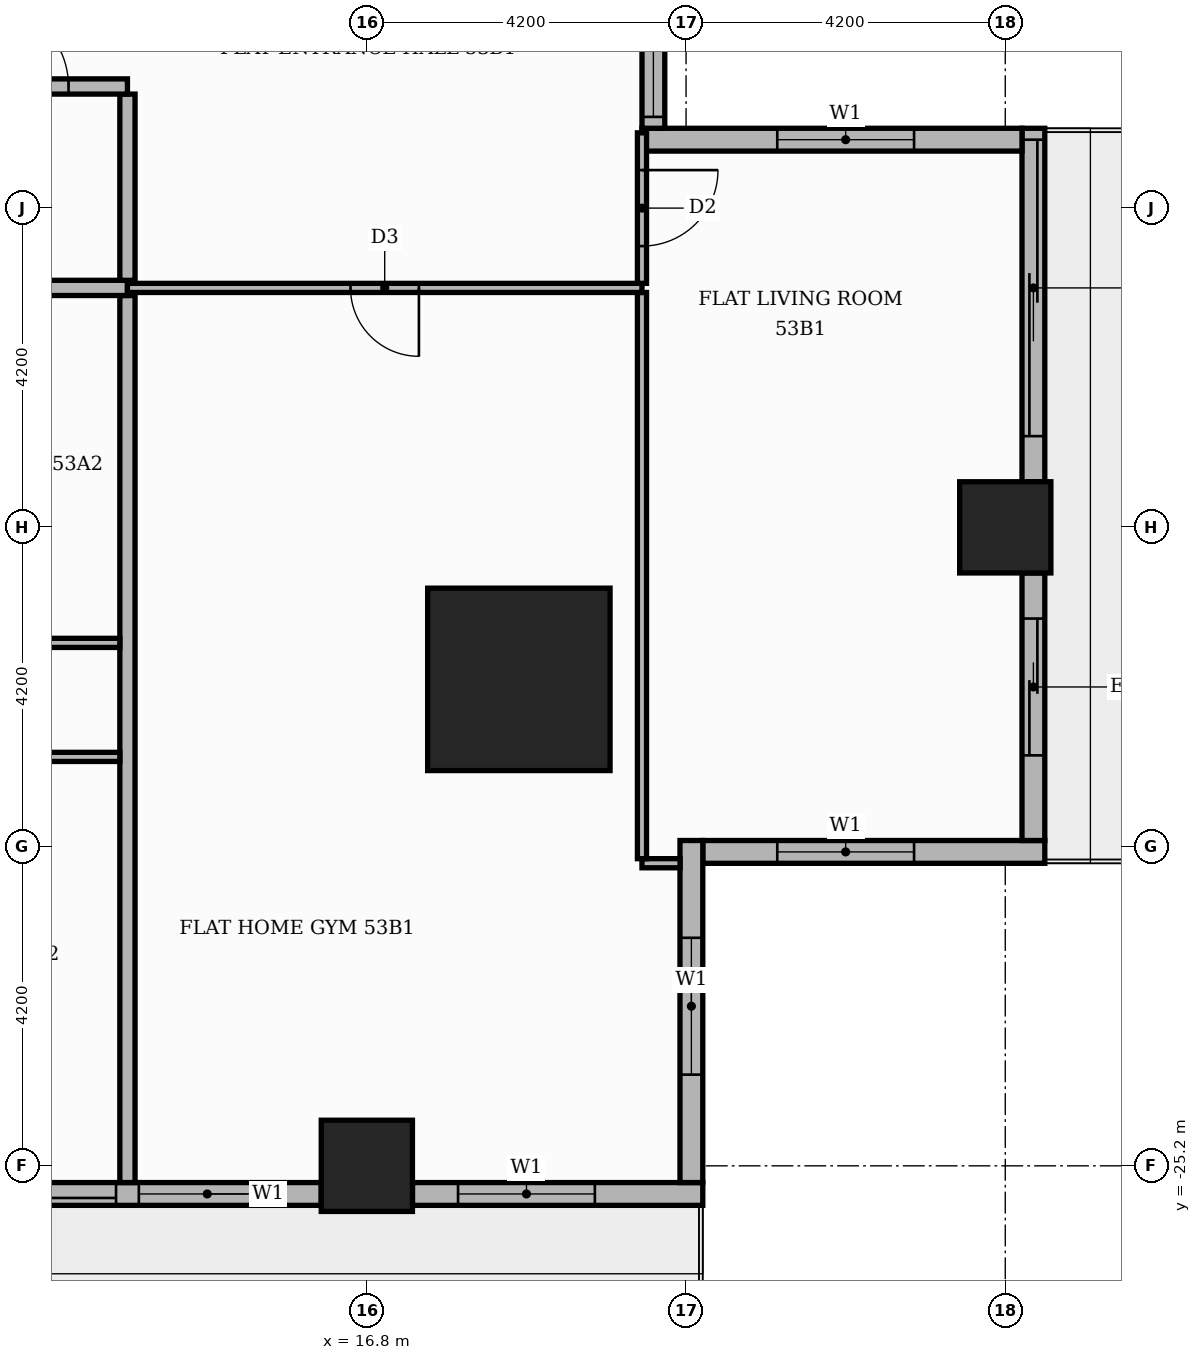
"""IFC4 building model, lengths in metres.
Left out: names, types, materials, properties, quantities, classifications, styles, units other than length and angle.
Written with IfcOpenShell. Run it as: python <this file> out.ifc"""

import sys

from ifc_helpers import new_model, si_unit, direction, frame, frame_2d, origin, origin_2d, place, context, subcontext, project, spatial, rectangle, extrude, element, fill, save


model = new_model("IFC4")
c1 = context("Model", 3, precision=1e-05, world=origin(), true_north=direction((0.0, 1.0)))
c2 = subcontext(c1, "Body", "Model", "MODEL_VIEW")
j1 = project(units=[si_unit("LENGTHUNIT", "METRE"), si_unit("PLANEANGLEUNIT", "RADIAN")], contexts=[c1])
p1 = place(None, origin())
s1 = spatial("IfcSite", under=j1, at=p1, CompositionType="ELEMENT")
p2 = place(p1, origin())
s2 = spatial("IfcBuilding", under=s1, at=p2, CompositionType="ELEMENT")
p3 = place(p2, frame((0.0, 0.0, 223.5)))
s3 = spatial("IfcBuildingStorey", under=s2, at=p3, CompositionType="ELEMENT", Elevation=223.5)
p4 = place(p3, frame((18.8, -18.8, 0.0), z_axis=(0.0, 0.0, 1.0), x_axis=(1.0, 0.0, 0.0)))
e1 = element("IfcColumn", 1, at=p4, inside=s3, PredefinedType="COLUMN", context=c2, shape_type="SweptSolid", body=[
    extrude(rectangle(XDim=2.4, YDim=2.4, at=origin_2d()), origin(), (0.0, 0.0, 1.0), 3.9),
])
for number, where, z_axis, x_axis in (
    (2, (25.2, -16.8, 0.0), (0.0, 0.0, 1.0), (1.0, 0.0, 0.0)),
    (3, (16.8, -25.2, 0.0), (0.0, 0.0, 1.0), (1.0, 0.0, 0.0)),
):
    element("IfcColumn", number, at=place(p3, frame(where, z_axis=z_axis, x_axis=x_axis)), inside=s3, PredefinedType="COLUMN", context=c2, shape_type="SweptSolid", body=[
        extrude(rectangle(XDim=1.2, YDim=1.2, at=origin_2d()), origin(), (0.0, 0.0, 1.0), 3.9),
    ])
p5 = place(p3, frame((21.22, -21.07, 0.0), z_axis=(0.0, 0.0, 1.0), x_axis=(1.0, 0.0, 0.0)))
e4 = element("IfcWall", 4, at=p5, inside=s3, PredefinedType="STANDARD", context=c2, shape_type="SweptSolid", body=[
    extrude(rectangle(XDim=4.5, YDim=0.3, at=frame_2d((2.25, 0.0))), origin(), (0.0, 0.0, 1.0), 3.48),
])
p6 = place(p5, frame((0.98, 0.0, 0.9)))
e5 = element("IfcOpeningElement", 5, at=p6, cuts=e4, PredefinedType="OPENING", context=c2, shape_type="SweptSolid", body=[
    extrude(rectangle(XDim=1.8, YDim=2.1, at=frame_2d((0.9, 1.05))), frame((0.0, 0.16, 0.0), z_axis=(0.0, -1.0, 0.0), x_axis=(1.0, 0.0, 0.0)), (0.0, 0.0, 1.0), 0.32),
])
p7 = place(p3, frame((25.57, -20.92, 0.0), z_axis=(0.0, 0.0, 1.0), x_axis=(0.0, 1.0, 0.0)))
e6 = element("IfcWall", 6, at=p7, inside=s3, PredefinedType="STANDARD", context=c2, shape_type="SweptSolid", body=[
    extrude(rectangle(XDim=3.52, YDim=0.3, at=frame_2d((1.76, 0.0))), origin(), (0.0, 0.0, 1.0), 3.48),
])
p8 = place(p7, frame((1.12, 0.0, 0.0)))
e7 = element("IfcOpeningElement", 7, at=p8, cuts=e6, PredefinedType="OPENING", context=c2, shape_type="SweptSolid", body=[
    extrude(rectangle(XDim=1.8, YDim=2.4, at=frame_2d((0.9, 1.2))), frame((0.0, 0.16, 0.0), z_axis=(0.0, -1.0, 0.0), x_axis=(1.0, 0.0, 0.0)), (0.0, 0.0, 1.0), 0.32),
])
p9 = place(p3, frame((25.57, -16.2, 0.0), z_axis=(0.0, 0.0, 1.0), x_axis=(0.0, 1.0, 0.0)))
e8 = element("IfcWall", 8, at=p9, inside=s3, PredefinedType="STANDARD", context=c2, shape_type="SweptSolid", body=[
    extrude(rectangle(XDim=4.65, YDim=0.3, at=frame_2d((2.325, 0.0))), origin(), (0.0, 0.0, 1.0), 3.48),
])
p10 = place(p9, frame((0.6, 0.0, 0.0)))
e9 = element("IfcOpeningElement", 9, at=p10, cuts=e8, PredefinedType="OPENING", context=c2, shape_type="SweptSolid", body=[
    extrude(rectangle(XDim=3.9, YDim=2.4, at=frame_2d((1.95, 1.2))), frame((0.0, 0.16, 0.0), z_axis=(0.0, -1.0, 0.0), x_axis=(1.0, 0.0, 0.0)), (0.0, 0.0, 1.0), 0.32),
])
p11 = place(p3, frame((25.42, -11.7, 0.0), z_axis=(0.0, 0.0, 1.0), x_axis=(-1.0, 0.0, 0.0)))
e10 = element("IfcWall", 10, at=p11, inside=s3, PredefinedType="STANDARD", context=c2, shape_type="SweptSolid", body=[
    extrude(rectangle(XDim=5.0, YDim=0.3, at=frame_2d((2.5, 0.0))), origin(), (0.0, 0.0, 1.0), 3.48),
])
p12 = place(p11, frame((1.42, 0.0, 0.9)))
e11 = element("IfcOpeningElement", 11, at=p12, cuts=e10, PredefinedType="OPENING", context=c2, shape_type="SweptSolid", body=[
    extrude(rectangle(XDim=1.8, YDim=2.1, at=frame_2d((0.9, 1.05))), frame((0.0, 0.16, 0.0), z_axis=(0.0, -1.0, 0.0), x_axis=(1.0, 0.0, 0.0)), (0.0, 0.0, 1.0), 0.32),
])
p13 = place(p3, frame((20.57, -11.55, 0.0), z_axis=(0.0, 0.0, 1.0), x_axis=(0.0, 1.0, 0.0)))
e12 = element("IfcWall", 12, at=p13, inside=s3, PredefinedType="STANDARD", context=c2, shape_type="SweptSolid", body=[
    extrude(rectangle(XDim=23.4, YDim=0.3, at=frame_2d((11.7, 0.0))), origin(), (0.0, 0.0, 1.0), 3.48),
])
p14 = place(p13, frame((0.15, 0.0, 0.9)))
e13 = element("IfcOpeningElement", 13, at=p14, cuts=e12, PredefinedType="OPENING", context=c2, shape_type="SweptSolid", body=[
    extrude(rectangle(XDim=6.0, YDim=2.1, at=frame_2d((3.0, 1.05))), frame((0.0, 0.16, 0.0), z_axis=(0.0, -1.0, 0.0), x_axis=(1.0, 0.0, 0.0)), (0.0, 0.0, 1.0), 0.32),
])
p15 = place(p13, frame((6.45, 0.0, 0.9)))
e14 = element("IfcOpeningElement", 14, at=p15, cuts=e12, PredefinedType="OPENING", context=c2, shape_type="SweptSolid", body=[
    extrude(rectangle(XDim=6.0, YDim=2.1, at=frame_2d((3.0, 1.05))), frame((0.0, 0.16, 0.0), z_axis=(0.0, -1.0, 0.0), x_axis=(1.0, 0.0, 0.0)), (0.0, 0.0, 1.0), 0.32),
])
p16 = place(p13, frame((12.75, 0.0, 0.9)))
e15 = element("IfcOpeningElement", 15, at=p16, cuts=e12, PredefinedType="OPENING", context=c2, shape_type="SweptSolid", body=[
    extrude(rectangle(XDim=6.0, YDim=2.1, at=frame_2d((3.0, 1.05))), frame((0.0, 0.16, 0.0), z_axis=(0.0, -1.0, 0.0), x_axis=(1.0, 0.0, 0.0)), (0.0, 0.0, 1.0), 0.32),
])
p17 = place(p13, frame((19.05, 0.0, 0.9)))
e16 = element("IfcOpeningElement", 16, at=p17, cuts=e12, PredefinedType="OPENING", context=c2, shape_type="SweptSolid", body=[
    extrude(rectangle(XDim=3.9, YDim=2.1, at=frame_2d((1.95, 1.05))), frame((0.0, 0.16, 0.0), z_axis=(0.0, -1.0, 0.0), x_axis=(1.0, 0.0, 0.0)), (0.0, 0.0, 1.0), 0.32),
])
p18 = place(p3, frame((9.0, -25.57, 0.0), z_axis=(0.0, 0.0, 1.0), x_axis=(1.0, 0.0, 0.0)))
e17 = element("IfcWall", 17, at=p18, inside=s3, PredefinedType="STANDARD", context=c2, shape_type="SweptSolid", body=[
    extrude(rectangle(XDim=7.2, YDim=0.3, at=frame_2d((3.6, 0.0))), origin(), (0.0, 0.0, 1.0), 3.48),
])
p19 = place(p18, frame((0.6, 0.0, 0.0)))
e18 = element("IfcOpeningElement", 18, at=p19, cuts=e17, PredefinedType="OPENING", context=c2, shape_type="SweptSolid", body=[
    extrude(rectangle(XDim=3.9, YDim=2.4, at=frame_2d((1.95, 1.2))), frame((0.0, 0.16, 0.0), z_axis=(0.0, -1.0, 0.0), x_axis=(1.0, 0.0, 0.0)), (0.0, 0.0, 1.0), 0.32),
])
p20 = place(p18, frame((4.8, 0.0, 0.9)))
e19 = element("IfcOpeningElement", 19, at=p20, cuts=e17, PredefinedType="OPENING", context=c2, shape_type="SweptSolid", body=[
    extrude(rectangle(XDim=1.8, YDim=2.1, at=frame_2d((0.9, 1.05))), frame((0.0, 0.16, 0.0), z_axis=(0.0, -1.0, 0.0), x_axis=(1.0, 0.0, 0.0)), (0.0, 0.0, 1.0), 0.32),
])
p21 = place(p3, frame((17.4, -25.57, 0.0), z_axis=(0.0, 0.0, 1.0), x_axis=(1.0, 0.0, 0.0)))
e20 = element("IfcWall", 20, at=p21, inside=s3, PredefinedType="STANDARD", context=c2, shape_type="SweptSolid", body=[
    extrude(rectangle(XDim=3.82, YDim=0.3, at=frame_2d((1.91, 0.0))), origin(), (0.0, 0.0, 1.0), 3.48),
])
p22 = place(p21, frame((0.6, 0.0, 0.9)))
e21 = element("IfcOpeningElement", 21, at=p22, cuts=e20, PredefinedType="OPENING", context=c2, shape_type="SweptSolid", body=[
    extrude(rectangle(XDim=1.8, YDim=2.1, at=frame_2d((0.9, 1.05))), frame((0.0, 0.16, 0.0), z_axis=(0.0, -1.0, 0.0), x_axis=(1.0, 0.0, 0.0)), (0.0, 0.0, 1.0), 0.32),
])
p23 = place(p3, frame((21.07, -25.42, 0.0), z_axis=(0.0, 0.0, 1.0), x_axis=(0.0, 1.0, 0.0)))
e22 = element("IfcWall", 22, at=p23, inside=s3, PredefinedType="STANDARD", context=c2, shape_type="SweptSolid", body=[
    extrude(rectangle(XDim=4.5, YDim=0.3, at=frame_2d((2.25, 0.0))), origin(), (0.0, 0.0, 1.0), 3.48),
])
p24 = place(p23, frame((1.42, 0.0, 0.9)))
e23 = element("IfcOpeningElement", 23, at=p24, cuts=e22, PredefinedType="OPENING", context=c2, shape_type="SweptSolid", body=[
    extrude(rectangle(XDim=1.8, YDim=2.1, at=frame_2d((0.9, 1.05))), frame((0.0, 0.16, 0.0), z_axis=(0.0, -1.0, 0.0), x_axis=(1.0, 0.0, 0.0)), (0.0, 0.0, 1.0), 0.32),
])
p25 = place(p3, frame((13.65, -25.42, 0.0), z_axis=(0.0, 0.0, 1.0), x_axis=(0.0, 1.0, 0.0)))
e24 = element("IfcWall", 24, at=p25, inside=s3, PredefinedType="PARTITIONING", context=c2, shape_type="SweptSolid", body=[
    extrude(rectangle(XDim=11.67, YDim=0.2, at=frame_2d((5.835, 0.0))), origin(), (0.0, 0.0, 1.0), 3.48),
])
p26 = place(p3, frame((20.42, -21.219, 0.0), z_axis=(0.0, 0.0, 1.0), x_axis=(1.0, 0.0, 0.0)))
e25 = element("IfcWall", 25, at=p26, inside=s3, PredefinedType="PARTITIONING", context=c2, shape_type="SweptSolid", body=[
    extrude(rectangle(XDim=0.501, YDim=0.12, at=frame_2d((0.25, 0.0))), origin(), (0.0, 0.0, 1.0), 3.48),
])
p27 = place(p3, frame((20.42, -21.159, 0.0), z_axis=(0.0, 0.0, 1.0), x_axis=(0.0, 1.0, 0.0)))
e26 = element("IfcWall", 26, at=p27, inside=s3, PredefinedType="PARTITIONING", context=c2, shape_type="SweptSolid", body=[
    extrude(rectangle(XDim=7.449, YDim=0.12, at=frame_2d((3.725, 0.0))), origin(), (0.0, 0.0, 1.0), 3.48),
])
p28 = place(p3, frame((-5.15, -19.82, 0.0), z_axis=(0.0, 0.0, 1.0), x_axis=(1.0, 0.0, 0.0)))
e27 = element("IfcWall", 27, at=p28, inside=s3, PredefinedType="PARTITIONING", context=c2, shape_type="SweptSolid", body=[
    extrude(rectangle(XDim=18.7, YDim=0.12, at=frame_2d((9.35, 0.0))), origin(), (0.0, 0.0, 1.0), 3.48),
])
p29 = place(p28, frame((3.65, 0.0, 0.0)))
e28 = element("IfcOpeningElement", 28, at=p29, cuts=e27, PredefinedType="OPENING", context=c2, shape_type="SweptSolid", body=[
    extrude(rectangle(XDim=0.9, YDim=2.1, at=frame_2d((0.45, 1.05))), frame((0.0, 0.07, 0.0), z_axis=(0.0, -1.0, 0.0), x_axis=(1.0, 0.0, 0.0)), (0.0, 0.0, 1.0), 0.14),
])
p30 = place(p28, frame((15.15, 0.0, 0.0)))
e29 = element("IfcOpeningElement", 29, at=p30, cuts=e27, PredefinedType="OPENING", context=c2, shape_type="SweptSolid", body=[
    extrude(rectangle(XDim=1.0, YDim=2.1, at=frame_2d((0.5, 1.05))), frame((0.0, 0.07, 0.0), z_axis=(0.0, -1.0, 0.0), x_axis=(1.0, 0.0, 0.0)), (0.0, 0.0, 1.0), 0.14),
])
p31 = place(p3, frame((1.05, -18.32, 0.0), z_axis=(0.0, 0.0, 1.0), x_axis=(1.0, 0.0, 0.0)))
e30 = element("IfcWall", 30, at=p31, inside=s3, PredefinedType="PARTITIONING", context=c2, shape_type="SweptSolid", body=[
    extrude(rectangle(XDim=12.5, YDim=0.12, at=frame_2d((6.25, 0.0))), origin(), (0.0, 0.0, 1.0), 3.48),
])
p32 = place(p31, frame((2.775, 0.0, 0.0)))
e31 = element("IfcOpeningElement", 31, at=p32, cuts=e30, PredefinedType="OPENING", context=c2, shape_type="SweptSolid", body=[
    extrude(rectangle(XDim=0.9, YDim=2.1, at=frame_2d((0.45, 1.05))), frame((0.0, 0.07, 0.0), z_axis=(0.0, -1.0, 0.0), x_axis=(1.0, 0.0, 0.0)), (0.0, 0.0, 1.0), 0.14),
])
p33 = place(p31, frame((6.975, 0.0, 0.0)))
e32 = element("IfcOpeningElement", 32, at=p33, cuts=e30, PredefinedType="OPENING", context=c2, shape_type="SweptSolid", body=[
    extrude(rectangle(XDim=0.9, YDim=2.1, at=frame_2d((0.45, 1.05))), frame((0.0, 0.07, 0.0), z_axis=(0.0, -1.0, 0.0), x_axis=(1.0, 0.0, 0.0)), (0.0, 0.0, 1.0), 0.14),
])
p34 = place(p31, frame((10.05, 0.0, 0.0)))
e33 = element("IfcOpeningElement", 33, at=p34, cuts=e30, PredefinedType="OPENING", context=c2, shape_type="SweptSolid", body=[
    extrude(rectangle(XDim=0.9, YDim=2.1, at=frame_2d((0.45, 1.05))), frame((0.0, 0.07, 0.0), z_axis=(0.0, -1.0, 0.0), x_axis=(1.0, 0.0, 0.0)), (0.0, 0.0, 1.0), 0.14),
])
p35 = place(p3, frame((-25.42, -13.65, 0.0), z_axis=(0.0, 0.0, 1.0), x_axis=(1.0, 0.0, 0.0)))
e34 = element("IfcWall", 34, at=p35, inside=s3, PredefinedType="PARTITIONING", context=c2, shape_type="SweptSolid", body=[
    extrude(rectangle(XDim=39.07, YDim=0.2, at=frame_2d((19.535, 0.0))), origin(), (0.0, 0.0, 1.0), 3.48),
])
p36 = place(p35, frame((13.32, 0.0, 0.0)))
e35 = element("IfcOpeningElement", 35, at=p36, cuts=e34, PredefinedType="OPENING", context=c2, shape_type="SweptSolid", body=[
    extrude(rectangle(XDim=1.1, YDim=2.4, at=frame_2d((0.55, 1.2))), frame((0.0, 0.11, 0.0), z_axis=(0.0, -1.0, 0.0), x_axis=(1.0, 0.0, 0.0)), (0.0, 0.0, 1.0), 0.22),
])
p37 = place(p35, frame((23.82, 0.0, 0.0)))
e36 = element("IfcOpeningElement", 36, at=p37, cuts=e34, PredefinedType="OPENING", context=c2, shape_type="SweptSolid", body=[
    extrude(rectangle(XDim=1.1, YDim=2.4, at=frame_2d((0.55, 1.2))), frame((0.0, 0.11, 0.0), z_axis=(0.0, -1.0, 0.0), x_axis=(1.0, 0.0, 0.0)), (0.0, 0.0, 1.0), 0.22),
])
p38 = place(p3, frame((13.65, -13.65, 0.0), z_axis=(0.0, 0.0, 1.0), x_axis=(1.0, 0.0, 0.0)))
e37 = element("IfcWall", 37, at=p38, inside=s3, PredefinedType="PARTITIONING", context=c2, shape_type="SweptSolid", body=[
    extrude(rectangle(XDim=6.77, YDim=0.12, at=frame_2d((3.385, 0.0))), origin(), (0.0, 0.0, 1.0), 3.48),
])
p39 = place(p38, frame((2.935, 0.0, 0.0)))
e38 = element("IfcOpeningElement", 38, at=p39, cuts=e37, PredefinedType="OPENING", context=c2, shape_type="SweptSolid", body=[
    extrude(rectangle(XDim=0.9, YDim=2.1, at=frame_2d((0.45, 1.05))), frame((0.0, 0.07, 0.0), z_axis=(0.0, -1.0, 0.0), x_axis=(1.0, 0.0, 0.0)), (0.0, 0.0, 1.0), 0.14),
])
p40 = place(p3, frame((20.42, -13.59, 0.0), z_axis=(0.0, 0.0, 1.0), x_axis=(0.0, 1.0, 0.0)))
e39 = element("IfcWall", 39, at=p40, inside=s3, PredefinedType="PARTITIONING", context=c2, shape_type="SweptSolid", body=[
    extrude(rectangle(XDim=1.98, YDim=0.12, at=frame_2d((0.99, 0.0))), origin(), (0.0, 0.0, 1.0), 3.48),
])
p41 = place(p40, frame((0.49, 0.0, 0.0)))
e40 = element("IfcOpeningElement", 40, at=p41, cuts=e39, PredefinedType="OPENING", context=c2, shape_type="SweptSolid", body=[
    extrude(rectangle(XDim=1.0, YDim=2.1, at=frame_2d((0.5, 1.05))), frame((0.0, 0.07, 0.0), z_axis=(0.0, -1.0, 0.0), x_axis=(1.0, 0.0, 0.0)), (0.0, 0.0, 1.0), 0.14),
])
p42 = place(p3, frame((13.65, -13.55, 0.0), z_axis=(0.0, 0.0, 1.0), x_axis=(0.0, 1.0, 0.0)))
e41 = element("IfcWall", 41, at=p42, inside=s3, PredefinedType="PARTITIONING", context=c2, shape_type="SweptSolid", body=[
    extrude(rectangle(XDim=2.45, YDim=0.2, at=frame_2d((1.225, 0.0))), origin(), (0.0, 0.0, 1.0), 3.48),
])
p43 = place(p3, frame((11.0, -11.0, 0.0), z_axis=(0.0, 0.0, 1.0), x_axis=(1.0, 0.0, 0.0)))
e42 = element("IfcWall", 42, at=p43, inside=s3, PredefinedType="PARTITIONING", context=c2, shape_type="SweptSolid", body=[
    extrude(rectangle(XDim=2.65, YDim=0.2, at=frame_2d((1.325, 0.0))), origin(), (0.0, 0.0, 1.0), 3.48),
])
p44 = place(p43, frame((0.775, 0.0, 0.0)))
e43 = element("IfcOpeningElement", 43, at=p44, cuts=e42, PredefinedType="OPENING", context=c2, shape_type="SweptSolid", body=[
    extrude(rectangle(XDim=1.1, YDim=2.4, at=frame_2d((0.55, 1.2))), frame((0.0, 0.11, 0.0), z_axis=(0.0, -1.0, 0.0), x_axis=(1.0, 0.0, 0.0)), (0.0, 0.0, 1.0), 0.22),
])
p45 = place(p6, origin())
e44 = element("IfcWindow", 44, at=p45, inside=s3, PartitioningType="SINGLE_PANEL", PredefinedType="WINDOW", context=c2, shape_type="SweptSolid", body=[
    extrude(rectangle(XDim=1.8, YDim=2.1, at=frame_2d((0.9, 1.05))), frame((0.0, 0.03, 0.0), z_axis=(0.0, -1.0, 0.0), x_axis=(1.0, 0.0, 0.0)), (0.0, 0.0, 1.0), 0.06),
])
fill(e5, e44)
p46 = place(p8, origin())
e45 = element("IfcDoor", 45, at=p46, inside=s3, OperationType="SLIDING_TO_RIGHT", PredefinedType="DOOR", context=c2, shape_type="SweptSolid", body=[
    extrude(rectangle(XDim=1.8, YDim=2.4, at=frame_2d((0.9, 1.2))), frame((0.0, 0.025, 0.0), z_axis=(0.0, -1.0, 0.0), x_axis=(1.0, 0.0, 0.0)), (0.0, 0.0, 1.0), 0.05),
])
fill(e7, e45)
p47 = place(p10, origin())
e46 = element("IfcDoor", 46, at=p47, inside=s3, OperationType="SLIDING_TO_LEFT", PredefinedType="DOOR", context=c2, shape_type="SweptSolid", body=[
    extrude(rectangle(XDim=3.9, YDim=2.4, at=frame_2d((1.95, 1.2))), frame((0.0, 0.025, 0.0), z_axis=(0.0, -1.0, 0.0), x_axis=(1.0, 0.0, 0.0)), (0.0, 0.0, 1.0), 0.05),
])
fill(e9, e46)
p48 = place(p12, origin())
e47 = element("IfcWindow", 47, at=p48, inside=s3, PartitioningType="SINGLE_PANEL", PredefinedType="WINDOW", context=c2, shape_type="SweptSolid", body=[
    extrude(rectangle(XDim=1.8, YDim=2.1, at=frame_2d((0.9, 1.05))), frame((0.0, 0.03, 0.0), z_axis=(0.0, -1.0, 0.0), x_axis=(1.0, 0.0, 0.0)), (0.0, 0.0, 1.0), 0.06),
])
fill(e11, e47)
p49 = place(p14, origin())
e48 = element("IfcWindow", 48, at=p49, inside=s3, PartitioningType="SINGLE_PANEL", PredefinedType="WINDOW", context=c2, shape_type="SweptSolid", body=[
    extrude(rectangle(XDim=6.0, YDim=2.1, at=frame_2d((3.0, 1.05))), frame((0.0, 0.03, 0.0), z_axis=(0.0, -1.0, 0.0), x_axis=(1.0, 0.0, 0.0)), (0.0, 0.0, 1.0), 0.06),
])
fill(e13, e48)
p50 = place(p19, origin())
e49 = element("IfcDoor", 49, at=p50, inside=s3, OperationType="SLIDING_TO_LEFT", PredefinedType="DOOR", context=c2, shape_type="SweptSolid", body=[
    extrude(rectangle(XDim=3.9, YDim=2.4, at=frame_2d((1.95, 1.2))), frame((0.0, 0.025, 0.0), z_axis=(0.0, -1.0, 0.0), x_axis=(1.0, 0.0, 0.0)), (0.0, 0.0, 1.0), 0.05),
])
fill(e18, e49)
p51 = place(p20, origin())
e50 = element("IfcWindow", 50, at=p51, inside=s3, PartitioningType="SINGLE_PANEL", PredefinedType="WINDOW", context=c2, shape_type="SweptSolid", body=[
    extrude(rectangle(XDim=1.8, YDim=2.1, at=frame_2d((0.9, 1.05))), frame((0.0, 0.03, 0.0), z_axis=(0.0, -1.0, 0.0), x_axis=(1.0, 0.0, 0.0)), (0.0, 0.0, 1.0), 0.06),
])
fill(e19, e50)
p52 = place(p22, origin())
e51 = element("IfcWindow", 51, at=p52, inside=s3, PartitioningType="SINGLE_PANEL", PredefinedType="WINDOW", context=c2, shape_type="SweptSolid", body=[
    extrude(rectangle(XDim=1.8, YDim=2.1, at=frame_2d((0.9, 1.05))), frame((0.0, 0.03, 0.0), z_axis=(0.0, -1.0, 0.0), x_axis=(1.0, 0.0, 0.0)), (0.0, 0.0, 1.0), 0.06),
])
fill(e21, e51)
p53 = place(p24, origin())
e52 = element("IfcWindow", 52, at=p53, inside=s3, PartitioningType="SINGLE_PANEL", PredefinedType="WINDOW", context=c2, shape_type="SweptSolid", body=[
    extrude(rectangle(XDim=1.8, YDim=2.1, at=frame_2d((0.9, 1.05))), frame((0.0, 0.03, 0.0), z_axis=(0.0, -1.0, 0.0), x_axis=(1.0, 0.0, 0.0)), (0.0, 0.0, 1.0), 0.06),
])
fill(e23, e52)
p54 = place(p44, origin())
e53 = element("IfcDoor", 53, at=p54, inside=s3, OperationType="SINGLE_SWING_LEFT", PredefinedType="DOOR", context=c2, shape_type="SweptSolid", body=[
    extrude(rectangle(XDim=1.1, YDim=2.4, at=frame_2d((0.55, 1.2))), frame((0.0, 0.025, 0.0), z_axis=(0.0, -1.0, 0.0), x_axis=(1.0, 0.0, 0.0)), (0.0, 0.0, 1.0), 0.05),
])
fill(e43, e53)
p55 = place(p39, frame((0.9, 0.0, 0.0), z_axis=(0.0, 0.0, 1.0), x_axis=(-1.0, 0.0, 0.0)))
e54 = element("IfcDoor", 54, at=p55, inside=s3, OperationType="SINGLE_SWING_RIGHT", PredefinedType="DOOR", context=c2, shape_type="SweptSolid", body=[
    extrude(rectangle(XDim=0.9, YDim=2.1, at=frame_2d((0.45, 1.05))), frame((0.0, 0.025, 0.0), z_axis=(0.0, -1.0, 0.0), x_axis=(1.0, 0.0, 0.0)), (0.0, 0.0, 1.0), 0.05),
])
fill(e38, e54)
p56 = place(p41, frame((1.0, 0.0, 0.0), z_axis=(0.0, 0.0, 1.0), x_axis=(-1.0, 0.0, 0.0)))
e55 = element("IfcDoor", 55, at=p56, inside=s3, OperationType="SINGLE_SWING_RIGHT", PredefinedType="DOOR", context=c2, shape_type="SweptSolid", body=[
    extrude(rectangle(XDim=1.0, YDim=2.1, at=frame_2d((0.5, 1.05))), frame((0.0, 0.025, 0.0), z_axis=(0.0, -1.0, 0.0), x_axis=(1.0, 0.0, 0.0)), (0.0, 0.0, 1.0), 0.05),
])
fill(e40, e55)
save(model, sys.argv[1])
